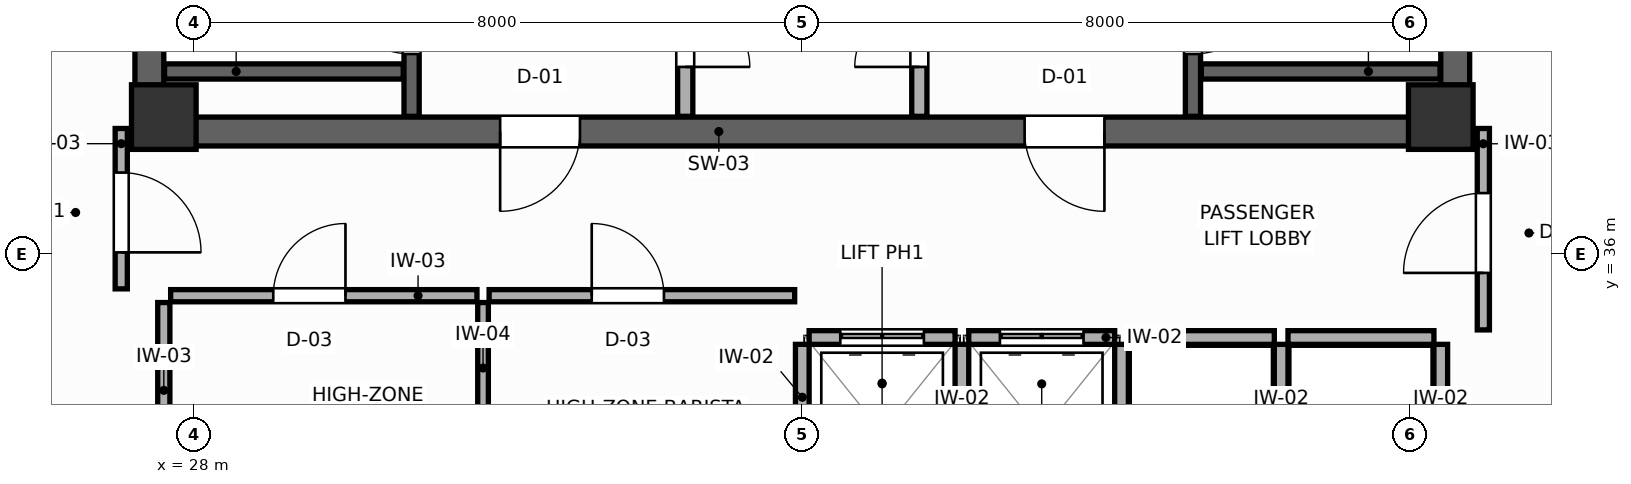
"""IFC4 building model, lengths in metres.
Left out: names, types, materials, properties, quantities, classifications, styles, units other than length and angle.
Written with IfcOpenShell. Run it as: python <this file> out.ifc"""

import sys

from ifc_helpers import new_model, si_unit, direction, frame, frame_2d, origin, origin_2d, place, context, subcontext, project, spatial, rectangle, extrude, source, transform, mapped, element, fill, save


model = new_model("IFC4")
c1 = context("Model", 3, precision=1e-05, world=origin(), true_north=direction((0.0, 1.0)))
c2 = subcontext(c1, "Body", "Model", "MODEL_VIEW")
j1 = project(units=[si_unit("LENGTHUNIT", "METRE"), si_unit("PLANEANGLEUNIT", "RADIAN")], contexts=[c1])
p1 = place(None, origin())
s1 = spatial("IfcSite", under=j1, at=p1, CompositionType="ELEMENT")
p2 = place(p1, origin())
s2 = spatial("IfcBuilding", under=s1, at=p2, CompositionType="ELEMENT")
p3 = place(p2, frame((0.0, 0.0, 261.0)))
s3 = spatial("IfcBuildingStorey", under=s2, at=p3, CompositionType="ELEMENT", Elevation=261.0)
p4 = place(p3, frame((27.22, 37.61, 0.0), z_axis=(0.0, 0.0, 1.0), x_axis=(1.0, 0.0, 0.0)))
e1 = element("IfcWall", 1, at=p4, inside=s3, PredefinedType="SHEAR", context=c2, shape_type="SweptSolid", body=[
    extrude(rectangle(XDim=17.56, YDim=0.38, at=frame_2d((8.78, 0.0))), origin(), (0.0, 0.0, 1.0), 3.6),
])
p5 = place(p4, frame((4.805, 0.0, 0.0)))
e2 = element("IfcOpeningElement", 2, at=p5, cuts=e1, PredefinedType="OPENING", context=c2, shape_type="SweptSolid", body=[
    extrude(rectangle(XDim=1.05, YDim=2.1, at=frame_2d((0.525, 1.05))), frame((0.0, 0.2, 0.0), z_axis=(0.0, -1.0, 0.0), x_axis=(1.0, 0.0, 0.0)), (0.0, 0.0, 1.0), 0.4),
])
p6 = place(p4, frame((11.705, 0.0, 0.0)))
e3 = element("IfcOpeningElement", 3, at=p6, cuts=e1, PredefinedType="OPENING", context=c2, shape_type="SweptSolid", body=[
    extrude(rectangle(XDim=1.05, YDim=2.1, at=frame_2d((0.525, 1.05))), frame((0.0, 0.2, 0.0), z_axis=(0.0, -1.0, 0.0), x_axis=(1.0, 0.0, 0.0)), (0.0, 0.0, 1.0), 0.4),
])
for number, where, z_axis, x_axis in (
    (4, (27.41, 37.8, 0.0), (0.0, 0.0, 1.0), (0.0, 1.0, 0.0)),
    (5, (44.59, 37.8, 0.0), (0.0, 0.0, 1.0), (0.0, 1.0, 0.0)),
):
    element("IfcWall", number, at=place(p3, frame(where, z_axis=z_axis, x_axis=x_axis)), inside=s3, PredefinedType="SHEAR", context=c2, shape_type="SweptSolid", body=[
        extrude(rectangle(XDim=9.0, YDim=0.38, at=frame_2d((4.5, 0.0))), origin(), (0.0, 0.0, 1.0), 3.6),
    ])
m1 = source(origin(), c2, "Body", "SweptSolid", [
    extrude(rectangle(XDim=0.85, YDim=0.85, at=origin_2d()), origin(), (0.0, 0.0, 1.0), 3.6),
])
for number, where, z_axis, x_axis in (
    (6, (27.6, 37.8, 0.0), (0.0, 0.0, 1.0), (1.0, 0.0, 0.0)),
    (7, (44.4, 37.8, 0.0), (0.0, 0.0, 1.0), (1.0, 0.0, 0.0)),
):
    element("IfcColumn", number, at=place(p3, frame(where, z_axis=z_axis, x_axis=x_axis)), inside=s3, PredefinedType="COLUMN", context=c2, shape_type="MappedRepresentation", body=[
        mapped(m1, transform((0.0, 0.0, 0.0), scale=1.0)),
    ])
p7 = place(p3, frame((30.86, 37.81, 0.0), z_axis=(0.0, 0.0, 1.0), x_axis=(0.0, 1.0, 0.0)))
e8 = element("IfcWall", 8, at=p7, inside=s3, PredefinedType="SHEAR", context=c2, shape_type="SweptSolid", body=[
    extrude(rectangle(XDim=8.98, YDim=0.2, at=frame_2d((4.49, 0.0))), origin(), (0.0, 0.0, 1.0), 3.6),
])
p8 = place(p7, frame((0.82, 0.0, 0.0)))
e9 = element("IfcOpeningElement", 9, at=p8, cuts=e8, PredefinedType="OPENING", context=c2, shape_type="SweptSolid", body=[
    extrude(rectangle(XDim=1.05, YDim=2.1, at=frame_2d((0.525, 1.05))), frame((0.0, 0.11, 0.0), z_axis=(0.0, -1.0, 0.0), x_axis=(1.0, 0.0, 0.0)), (0.0, 0.0, 1.0), 0.22),
])
p9 = place(p3, frame((27.61, 38.4, 0.0), z_axis=(0.0, 0.0, 1.0), x_axis=(1.0, 0.0, 0.0)))
e10 = element("IfcWall", 10, at=p9, inside=s3, PredefinedType="SHEAR", context=c2, shape_type="SweptSolid", body=[
    extrude(rectangle(XDim=3.14, YDim=0.2, at=frame_2d((1.57, 0.0))), origin(), (0.0, 0.0, 1.0), 3.6),
])
p10 = place(p3, frame((41.14, 37.81, 0.0), z_axis=(0.0, 0.0, 1.0), x_axis=(0.0, 1.0, 0.0)))
e11 = element("IfcWall", 11, at=p10, inside=s3, PredefinedType="SHEAR", context=c2, shape_type="SweptSolid", body=[
    extrude(rectangle(XDim=8.98, YDim=0.2, at=frame_2d((4.49, 0.0))), origin(), (0.0, 0.0, 1.0), 3.6),
])
p11 = place(p10, frame((0.82, 0.0, 0.0)))
e12 = element("IfcOpeningElement", 12, at=p11, cuts=e11, PredefinedType="OPENING", context=c2, shape_type="SweptSolid", body=[
    extrude(rectangle(XDim=1.05, YDim=2.1, at=frame_2d((0.525, 1.05))), frame((0.0, 0.11, 0.0), z_axis=(0.0, -1.0, 0.0), x_axis=(1.0, 0.0, 0.0)), (0.0, 0.0, 1.0), 0.22),
])
p12 = place(p3, frame((41.25, 38.4, 0.0), z_axis=(0.0, 0.0, 1.0), x_axis=(1.0, 0.0, 0.0)))
e13 = element("IfcWall", 13, at=p12, inside=s3, PredefinedType="SHEAR", context=c2, shape_type="SweptSolid", body=[
    extrude(rectangle(XDim=3.14, YDim=0.2, at=frame_2d((1.57, 0.0))), origin(), (0.0, 0.0, 1.0), 3.6),
])
p13 = place(p3, frame((34.46, 37.81, 0.0), z_axis=(0.0, 0.0, 1.0), x_axis=(0.0, 1.0, 0.0)))
e14 = element("IfcWall", 14, at=p13, inside=s3, PredefinedType="PARTITIONING", context=c2, shape_type="SweptSolid", body=[
    extrude(rectangle(XDim=8.98, YDim=0.2, at=frame_2d((4.49, 0.0))), origin(), (0.0, 0.0, 1.0), 3.41),
])
p14 = place(p13, frame((0.65, 0.0, 0.0)))
e15 = element("IfcOpeningElement", 15, at=p14, cuts=e14, PredefinedType="OPENING", context=c2, shape_type="SweptSolid", body=[
    extrude(rectangle(XDim=0.85, YDim=2.05, at=frame_2d((0.425, 1.025))), frame((0.0, 0.11, 0.0), z_axis=(0.0, -1.0, 0.0), x_axis=(1.0, 0.0, 0.0)), (0.0, 0.0, 1.0), 0.22),
])
p15 = place(p3, frame((37.54, 37.81, 0.0), z_axis=(0.0, 0.0, 1.0), x_axis=(0.0, 1.0, 0.0)))
e16 = element("IfcWall", 16, at=p15, inside=s3, PredefinedType="PARTITIONING", context=c2, shape_type="SweptSolid", body=[
    extrude(rectangle(XDim=8.98, YDim=0.2, at=frame_2d((4.49, 0.0))), origin(), (0.0, 0.0, 1.0), 3.41),
])
p16 = place(p15, frame((0.65, 0.0, 0.0)))
e17 = element("IfcOpeningElement", 17, at=p16, cuts=e16, PredefinedType="OPENING", context=c2, shape_type="SweptSolid", body=[
    extrude(rectangle(XDim=0.85, YDim=2.05, at=frame_2d((0.425, 1.025))), frame((0.0, 0.11, 0.0), z_axis=(0.0, -1.0, 0.0), x_axis=(1.0, 0.0, 0.0)), (0.0, 0.0, 1.0), 0.22),
])
p17 = place(p3, frame((36.09, 34.9, 0.0), z_axis=(0.0, 0.0, 1.0), x_axis=(1.0, 0.0, 0.0)))
e18 = element("IfcWall", 18, at=p17, inside=s3, PredefinedType="PARTITIONING", context=c2, shape_type="SweptSolid", body=[
    extrude(rectangle(XDim=1.92, YDim=0.18, at=frame_2d((0.96, 0.0))), origin(), (0.0, 0.0, 1.0), 3.41),
])
p18 = place(p17, frame((0.41, 0.0, 0.0)))
e19 = element("IfcOpeningElement", 19, at=p18, cuts=e18, PredefinedType="OPENING", context=c2, shape_type="SweptSolid", body=[
    extrude(rectangle(XDim=1.1, YDim=2.1, at=frame_2d((0.55, 1.05))), frame((0.0, 0.1, 0.0), z_axis=(0.0, -1.0, 0.0), x_axis=(1.0, 0.0, 0.0)), (0.0, 0.0, 1.0), 0.2),
])
p19 = place(p3, frame((36.0, 32.49, 0.0), z_axis=(0.0, 0.0, 1.0), x_axis=(0.0, 1.0, 0.0)))
e20 = element("IfcWall", 20, at=p19, inside=s3, PredefinedType="PARTITIONING", context=c2, shape_type="SweptSolid", body=[
    extrude(rectangle(XDim=2.32, YDim=0.18, at=frame_2d((1.16, 0.0))), origin(), (0.0, 0.0, 1.0), 3.41),
])
p20 = place(p3, frame((38.19, 34.9, 0.0), z_axis=(0.0, 0.0, 1.0), x_axis=(1.0, 0.0, 0.0)))
e21 = element("IfcWall", 21, at=p20, inside=s3, PredefinedType="PARTITIONING", context=c2, shape_type="SweptSolid", body=[
    extrude(rectangle(XDim=1.92, YDim=0.18, at=frame_2d((0.96, 0.0))), origin(), (0.0, 0.0, 1.0), 3.41),
])
p21 = place(p20, frame((0.41, 0.0, 0.0)))
e22 = element("IfcOpeningElement", 22, at=p21, cuts=e21, PredefinedType="OPENING", context=c2, shape_type="SweptSolid", body=[
    extrude(rectangle(XDim=1.1, YDim=2.1, at=frame_2d((0.55, 1.05))), frame((0.0, 0.1, 0.0), z_axis=(0.0, -1.0, 0.0), x_axis=(1.0, 0.0, 0.0)), (0.0, 0.0, 1.0), 0.2),
])
p22 = place(p3, frame((38.1, 32.49, 0.0), z_axis=(0.0, 0.0, 1.0), x_axis=(0.0, 1.0, 0.0)))
e23 = element("IfcWall", 23, at=p22, inside=s3, PredefinedType="PARTITIONING", context=c2, shape_type="SweptSolid", body=[
    extrude(rectangle(XDim=2.32, YDim=0.18, at=frame_2d((1.16, 0.0))), origin(), (0.0, 0.0, 1.0), 3.41),
])
p23 = place(p3, frame((40.29, 34.9, 0.0), z_axis=(0.0, 0.0, 1.0), x_axis=(1.0, 0.0, 0.0)))
e24 = element("IfcWall", 24, at=p23, inside=s3, PredefinedType="PARTITIONING", context=c2, shape_type="SweptSolid", body=[
    extrude(rectangle(XDim=1.92, YDim=0.18, at=frame_2d((0.96, 0.0))), origin(), (0.0, 0.0, 1.0), 3.41),
])
p24 = place(p3, frame((40.2, 32.49, 0.0), z_axis=(0.0, 0.0, 1.0), x_axis=(0.0, 1.0, 0.0)))
e25 = element("IfcWall", 25, at=p24, inside=s3, PredefinedType="PARTITIONING", context=c2, shape_type="SweptSolid", body=[
    extrude(rectangle(XDim=2.32, YDim=0.18, at=frame_2d((1.16, 0.0))), origin(), (0.0, 0.0, 1.0), 3.41),
])
p25 = place(p3, frame((42.39, 34.9, 0.0), z_axis=(0.0, 0.0, 1.0), x_axis=(1.0, 0.0, 0.0)))
e26 = element("IfcWall", 26, at=p25, inside=s3, PredefinedType="PARTITIONING", context=c2, shape_type="SweptSolid", body=[
    extrude(rectangle(XDim=1.92, YDim=0.18, at=frame_2d((0.96, 0.0))), origin(), (0.0, 0.0, 1.0), 3.41),
])
for number, where, z_axis, x_axis in (
    (27, (42.3, 32.49, 0.0), (0.0, 0.0, 1.0), (0.0, 1.0, 0.0)),
    (28, (44.4, 32.49, 0.0), (0.0, 0.0, 1.0), (0.0, 1.0, 0.0)),
):
    element("IfcWall", number, at=place(p3, frame(where, z_axis=z_axis, x_axis=x_axis)), inside=s3, PredefinedType="PARTITIONING", context=c2, shape_type="SweptSolid", body=[
        extrude(rectangle(XDim=2.32, YDim=0.18, at=frame_2d((1.16, 0.0))), origin(), (0.0, 0.0, 1.0), 3.41),
    ])
p26 = place(p3, frame((27.6, 33.05, 0.0), z_axis=(0.0, 0.0, 1.0), x_axis=(0.0, 1.0, 0.0)))
e29 = element("IfcWall", 29, at=p26, inside=s3, PredefinedType="PARTITIONING", context=c2, shape_type="SweptSolid", body=[
    extrude(rectangle(XDim=2.31, YDim=0.16, at=frame_2d((1.155, 0.0))), origin(), (0.0, 0.0, 1.0), 3.41),
])
p27 = place(p3, frame((31.8, 32.49, 0.0), z_axis=(0.0, 0.0, 1.0), x_axis=(0.0, 1.0, 0.0)))
e30 = element("IfcWall", 30, at=p27, inside=s3, PredefinedType="PARTITIONING", context=c2, shape_type="SweptSolid", body=[
    extrude(rectangle(XDim=2.87, YDim=0.14, at=frame_2d((1.435, 0.0))), origin(), (0.0, 0.0, 1.0), 3.41),
])
p28 = place(p3, frame((27.69, 35.45, 0.0), z_axis=(0.0, 0.0, 1.0), x_axis=(1.0, 0.0, 0.0)))
e31 = element("IfcWall", 31, at=p28, inside=s3, PredefinedType="PARTITIONING", context=c2, shape_type="SweptSolid", body=[
    extrude(rectangle(XDim=4.03, YDim=0.16, at=frame_2d((2.015, 0.0))), origin(), (0.0, 0.0, 1.0), 3.41),
])
p29 = place(p28, frame((1.35, 0.0, 0.0)))
e32 = element("IfcOpeningElement", 32, at=p29, cuts=e31, PredefinedType="OPENING", context=c2, shape_type="SweptSolid", body=[
    extrude(rectangle(XDim=0.95, YDim=2.05, at=frame_2d((0.475, 1.025))), frame((0.0, 0.09, 0.0), z_axis=(0.0, -1.0, 0.0), x_axis=(1.0, 0.0, 0.0)), (0.0, 0.0, 1.0), 0.18),
])
p30 = place(p3, frame((31.88, 35.45, 0.0), z_axis=(0.0, 0.0, 1.0), x_axis=(1.0, 0.0, 0.0)))
e33 = element("IfcWall", 33, at=p30, inside=s3, PredefinedType="PARTITIONING", context=c2, shape_type="SweptSolid", body=[
    extrude(rectangle(XDim=4.02, YDim=0.16, at=frame_2d((2.01, 0.0))), origin(), (0.0, 0.0, 1.0), 3.41),
])
p31 = place(p30, frame((1.35, 0.0, 0.0)))
e34 = element("IfcOpeningElement", 34, at=p31, cuts=e33, PredefinedType="OPENING", context=c2, shape_type="SweptSolid", body=[
    extrude(rectangle(XDim=0.95, YDim=2.05, at=frame_2d((0.475, 1.025))), frame((0.0, 0.09, 0.0), z_axis=(0.0, -1.0, 0.0), x_axis=(1.0, 0.0, 0.0)), (0.0, 0.0, 1.0), 0.18),
])
p32 = place(p3, frame((27.04, 35.54, 0.0), z_axis=(0.0, 0.0, 1.0), x_axis=(0.0, 1.0, 0.0)))
e35 = element("IfcWall", 35, at=p32, inside=s3, PredefinedType="PARTITIONING", context=c2, shape_type="SweptSolid", body=[
    extrude(rectangle(XDim=2.11, YDim=0.16, at=frame_2d((1.055, 0.0))), origin(), (0.0, 0.0, 1.0), 3.41),
])
p33 = place(p32, frame((0.48, 0.0, 0.0)))
e36 = element("IfcOpeningElement", 36, at=p33, cuts=e35, PredefinedType="OPENING", context=c2, shape_type="SweptSolid", body=[
    extrude(rectangle(XDim=1.05, YDim=2.1, at=frame_2d((0.525, 1.05))), frame((0.0, 0.09, 0.0), z_axis=(0.0, -1.0, 0.0), x_axis=(1.0, 0.0, 0.0)), (0.0, 0.0, 1.0), 0.18),
])
p34 = place(p3, frame((44.96, 35.0, 0.0), z_axis=(0.0, 0.0, 1.0), x_axis=(0.0, 1.0, 0.0)))
e37 = element("IfcWall", 37, at=p34, inside=s3, PredefinedType="PARTITIONING", context=c2, shape_type="SweptSolid", body=[
    extrude(rectangle(XDim=2.65, YDim=0.16, at=frame_2d((1.325, 0.0))), origin(), (0.0, 0.0, 1.0), 3.41),
])
p35 = place(p34, frame((0.75, 0.0, 0.0)))
e38 = element("IfcOpeningElement", 38, at=p35, cuts=e37, PredefinedType="OPENING", context=c2, shape_type="SweptSolid", body=[
    extrude(rectangle(XDim=1.05, YDim=2.1, at=frame_2d((0.525, 1.05))), frame((0.0, 0.09, 0.0), z_axis=(0.0, -1.0, 0.0), x_axis=(1.0, 0.0, 0.0)), (0.0, 0.0, 1.0), 0.18),
])
p36 = place(p8, origin())
e39 = element("IfcDoor", 39, at=p36, inside=s3, OperationType="SINGLE_SWING_RIGHT", PredefinedType="DOOR", context=c2, shape_type="SweptSolid", body=[
    extrude(rectangle(XDim=1.05, YDim=2.1, at=frame_2d((0.525, 1.05))), frame((0.0, 0.025, 0.0), z_axis=(0.0, -1.0, 0.0), x_axis=(1.0, 0.0, 0.0)), (0.0, 0.0, 1.0), 0.05),
])
fill(e9, e39)
p37 = place(p11, frame((1.05, 0.0, 0.0), z_axis=(0.0, 0.0, 1.0), x_axis=(-1.0, 0.0, 0.0)))
e40 = element("IfcDoor", 40, at=p37, inside=s3, OperationType="SINGLE_SWING_LEFT", PredefinedType="DOOR", context=c2, shape_type="SweptSolid", body=[
    extrude(rectangle(XDim=1.05, YDim=2.1, at=frame_2d((0.525, 1.05))), frame((0.0, 0.025, 0.0), z_axis=(0.0, -1.0, 0.0), x_axis=(1.0, 0.0, 0.0)), (0.0, 0.0, 1.0), 0.05),
])
fill(e12, e40)
p38 = place(p14, frame((0.85, 0.0, 0.0), z_axis=(0.0, 0.0, 1.0), x_axis=(-1.0, 0.0, 0.0)))
e41 = element("IfcDoor", 41, at=p38, inside=s3, OperationType="SINGLE_SWING_RIGHT", PredefinedType="DOOR", context=c2, shape_type="SweptSolid", body=[
    extrude(rectangle(XDim=0.85, YDim=2.05, at=frame_2d((0.425, 1.025))), frame((0.0, 0.025, 0.0), z_axis=(0.0, -1.0, 0.0), x_axis=(1.0, 0.0, 0.0)), (0.0, 0.0, 1.0), 0.05),
])
fill(e15, e41)
p39 = place(p16, origin())
e42 = element("IfcDoor", 42, at=p39, inside=s3, OperationType="SINGLE_SWING_LEFT", PredefinedType="DOOR", context=c2, shape_type="SweptSolid", body=[
    extrude(rectangle(XDim=0.85, YDim=2.05, at=frame_2d((0.425, 1.025))), frame((0.0, 0.025, 0.0), z_axis=(0.0, -1.0, 0.0), x_axis=(1.0, 0.0, 0.0)), (0.0, 0.0, 1.0), 0.05),
])
fill(e17, e42)
p40 = place(p18, origin())
e43 = element("IfcDoor", 43, at=p40, inside=s3, OperationType="DOUBLE_DOOR_SLIDING", PredefinedType="DOOR", context=c2, shape_type="SweptSolid", body=[
    extrude(rectangle(XDim=1.1, YDim=2.1, at=frame_2d((0.55, 1.05))), frame((0.0, 0.025, 0.0), z_axis=(0.0, -1.0, 0.0), x_axis=(1.0, 0.0, 0.0)), (0.0, 0.0, 1.0), 0.05),
])
fill(e19, e43)
p41 = place(p21, origin())
e44 = element("IfcDoor", 44, at=p41, inside=s3, OperationType="DOUBLE_DOOR_SLIDING", PredefinedType="DOOR", context=c2, shape_type="SweptSolid", body=[
    extrude(rectangle(XDim=1.1, YDim=2.1, at=frame_2d((0.55, 1.05))), frame((0.0, 0.025, 0.0), z_axis=(0.0, -1.0, 0.0), x_axis=(1.0, 0.0, 0.0)), (0.0, 0.0, 1.0), 0.05),
])
fill(e22, e44)
p42 = place(p29, origin())
e45 = element("IfcDoor", 45, at=p42, inside=s3, OperationType="SINGLE_SWING_RIGHT", PredefinedType="DOOR", context=c2, shape_type="SweptSolid", body=[
    extrude(rectangle(XDim=0.95, YDim=2.05, at=frame_2d((0.475, 1.025))), frame((0.0, 0.025, 0.0), z_axis=(0.0, -1.0, 0.0), x_axis=(1.0, 0.0, 0.0)), (0.0, 0.0, 1.0), 0.05),
])
fill(e32, e45)
p43 = place(p31, origin())
e46 = element("IfcDoor", 46, at=p43, inside=s3, OperationType="SINGLE_SWING_LEFT", PredefinedType="DOOR", context=c2, shape_type="SweptSolid", body=[
    extrude(rectangle(XDim=0.95, YDim=2.05, at=frame_2d((0.475, 1.025))), frame((0.0, 0.025, 0.0), z_axis=(0.0, -1.0, 0.0), x_axis=(1.0, 0.0, 0.0)), (0.0, 0.0, 1.0), 0.05),
])
fill(e34, e46)
p44 = place(p33, frame((1.05, 0.0, 0.0), z_axis=(0.0, 0.0, 1.0), x_axis=(-1.0, 0.0, 0.0)))
e47 = element("IfcDoor", 47, at=p44, inside=s3, OperationType="SINGLE_SWING_RIGHT", PredefinedType="DOOR", context=c2, shape_type="SweptSolid", body=[
    extrude(rectangle(XDim=1.05, YDim=2.1, at=frame_2d((0.525, 1.05))), frame((0.0, 0.025, 0.0), z_axis=(0.0, -1.0, 0.0), x_axis=(1.0, 0.0, 0.0)), (0.0, 0.0, 1.0), 0.05),
])
fill(e36, e47)
p45 = place(p35, origin())
e48 = element("IfcDoor", 48, at=p45, inside=s3, OperationType="SINGLE_SWING_LEFT", PredefinedType="DOOR", context=c2, shape_type="SweptSolid", body=[
    extrude(rectangle(XDim=1.05, YDim=2.1, at=frame_2d((0.525, 1.05))), frame((0.0, 0.025, 0.0), z_axis=(0.0, -1.0, 0.0), x_axis=(1.0, 0.0, 0.0)), (0.0, 0.0, 1.0), 0.05),
])
fill(e38, e48)
p46 = place(p5, frame((1.05, 0.0, 0.0), z_axis=(0.0, 0.0, 1.0), x_axis=(-1.0, 0.0, 0.0)))
e49 = element("IfcDoor", 49, at=p46, inside=s3, OperationType="SINGLE_SWING_RIGHT", PredefinedType="DOOR", context=c2, shape_type="SweptSolid", body=[
    extrude(rectangle(XDim=1.05, YDim=2.1, at=frame_2d((0.525, 1.05))), frame((0.0, 0.025, 0.0), z_axis=(0.0, -1.0, 0.0), x_axis=(1.0, 0.0, 0.0)), (0.0, 0.0, 1.0), 0.05),
])
fill(e2, e49)
p47 = place(p6, frame((1.05, 0.0, 0.0), z_axis=(0.0, 0.0, 1.0), x_axis=(-1.0, 0.0, 0.0)))
e50 = element("IfcDoor", 50, at=p47, inside=s3, OperationType="SINGLE_SWING_LEFT", PredefinedType="DOOR", context=c2, shape_type="SweptSolid", body=[
    extrude(rectangle(XDim=1.05, YDim=2.1, at=frame_2d((0.525, 1.05))), frame((0.0, 0.025, 0.0), z_axis=(0.0, -1.0, 0.0), x_axis=(1.0, 0.0, 0.0)), (0.0, 0.0, 1.0), 0.05),
])
fill(e3, e50)
save(model, sys.argv[1])
